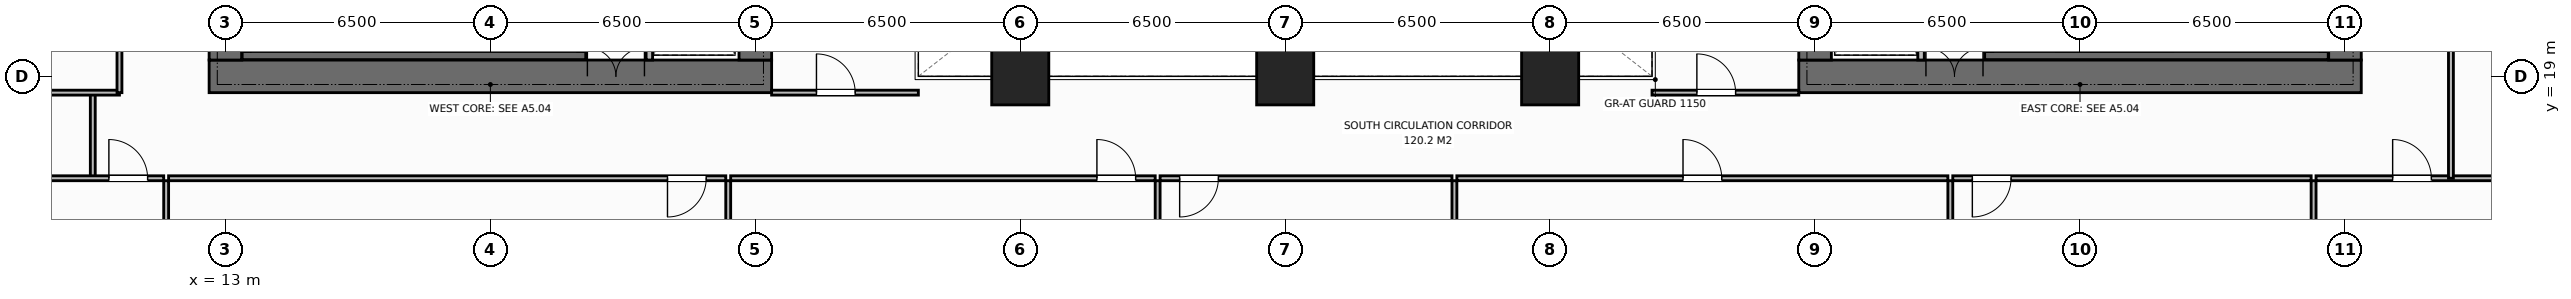
"""IFC4 building model, lengths in metres.
Left out: names, types, materials, properties, quantities, classifications, styles, units other than length and angle.
Written with IfcOpenShell. Run it as: python <this file> out.ifc"""

import sys

from ifc_helpers import new_model, si_unit, direction, frame, frame_2d, origin, origin_2d, place, context, subcontext, project, spatial, rectangle, extrude, element, fill, save


model = new_model("IFC4")
c1 = context("Model", 3, precision=1e-05, world=origin(), true_north=direction((0.0, 1.0)))
c2 = subcontext(c1, "Body", "Model", "MODEL_VIEW")
j1 = project(units=[si_unit("LENGTHUNIT", "METRE"), si_unit("PLANEANGLEUNIT", "RADIAN")], contexts=[c1])
p1 = place(None, origin())
s1 = spatial("IfcSite", under=j1, at=p1, CompositionType="ELEMENT")
p2 = place(p1, origin())
s2 = spatial("IfcBuilding", under=s1, at=p2, CompositionType="ELEMENT")
p3 = place(p2, frame((0.0, 0.0, 77.2)))
s3 = spatial("IfcBuildingStorey", under=s2, at=p3, CompositionType="ELEMENT", Elevation=77.2)
p4 = place(p3, frame((12.6, 19.0, 0.0), z_axis=(0.0, 0.0, 1.0), x_axis=(1.0, 0.0, 0.0)))
e1 = element("IfcWall", 1, at=p4, inside=s3, PredefinedType="SHEAR", context=c2, shape_type="SweptSolid", body=[
    extrude(rectangle(XDim=13.8, YDim=0.8, at=frame_2d((6.9, 0.0))), origin(), (0.0, 0.0, 1.0), 3.8),
])
p5 = place(p4, frame((9.28, 0.0, 0.0)))
e2 = element("IfcOpeningElement", 2, at=p5, cuts=e1, PredefinedType="OPENING", context=c2, shape_type="SweptSolid", body=[
    extrude(rectangle(XDim=1.4, YDim=2.2, at=frame_2d((0.7, 1.1))), frame((0.0, 0.41, 0.0), z_axis=(0.0, -1.0, 0.0), x_axis=(1.0, 0.0, 0.0)), (0.0, 0.0, 1.0), 0.82),
])
p6 = place(p3, frame((13.0, 19.4, 0.0), z_axis=(0.0, 0.0, 1.0), x_axis=(0.0, 1.0, 0.0)))
e3 = element("IfcWall", 3, at=p6, inside=s3, PredefinedType="SHEAR", context=c2, shape_type="SweptSolid", body=[
    extrude(rectangle(XDim=13.2, YDim=0.8, at=frame_2d((6.6, 0.0))), origin(), (0.0, 0.0, 1.0), 3.8),
])
p7 = place(p6, frame((4.65, 0.0, 0.0)))
e4 = element("IfcOpeningElement", 4, at=p7, cuts=e3, PredefinedType="OPENING", context=c2, shape_type="SweptSolid", body=[
    extrude(rectangle(XDim=1.4, YDim=2.2, at=frame_2d((0.7, 1.1))), frame((0.0, 0.41, 0.0), z_axis=(0.0, -1.0, 0.0), x_axis=(1.0, 0.0, 0.0)), (0.0, 0.0, 1.0), 0.82),
])
p8 = place(p3, frame((26.0, 19.4, 0.0), z_axis=(0.0, 0.0, 1.0), x_axis=(0.0, 1.0, 0.0)))
e5 = element("IfcWall", 5, at=p8, inside=s3, PredefinedType="SHEAR", context=c2, shape_type="SweptSolid", body=[
    extrude(rectangle(XDim=13.2, YDim=0.8, at=frame_2d((6.6, 0.0))), origin(), (0.0, 0.0, 1.0), 3.8),
])
p9 = place(p3, frame((51.6, 19.0, 0.0), z_axis=(0.0, 0.0, 1.0), x_axis=(1.0, 0.0, 0.0)))
e6 = element("IfcWall", 6, at=p9, inside=s3, PredefinedType="SHEAR", context=c2, shape_type="SweptSolid", body=[
    extrude(rectangle(XDim=13.8, YDim=0.8, at=frame_2d((6.9, 0.0))), origin(), (0.0, 0.0, 1.0), 3.8),
])
p10 = place(p9, frame((3.12, 0.0, 0.0)))
e7 = element("IfcOpeningElement", 7, at=p10, cuts=e6, PredefinedType="OPENING", context=c2, shape_type="SweptSolid", body=[
    extrude(rectangle(XDim=1.4, YDim=2.2, at=frame_2d((0.7, 1.1))), frame((0.0, 0.41, 0.0), z_axis=(0.0, -1.0, 0.0), x_axis=(1.0, 0.0, 0.0)), (0.0, 0.0, 1.0), 0.82),
])
p11 = place(p3, frame((52.0, 19.4, 0.0), z_axis=(0.0, 0.0, 1.0), x_axis=(0.0, 1.0, 0.0)))
e8 = element("IfcWall", 8, at=p11, inside=s3, PredefinedType="SHEAR", context=c2, shape_type="SweptSolid", body=[
    extrude(rectangle(XDim=13.2, YDim=0.8, at=frame_2d((6.6, 0.0))), origin(), (0.0, 0.0, 1.0), 3.8),
])
p12 = place(p3, frame((65.0, 19.4, 0.0), z_axis=(0.0, 0.0, 1.0), x_axis=(0.0, 1.0, 0.0)))
e9 = element("IfcWall", 9, at=p12, inside=s3, PredefinedType="SHEAR", context=c2, shape_type="SweptSolid", body=[
    extrude(rectangle(XDim=13.2, YDim=0.8, at=frame_2d((6.6, 0.0))), origin(), (0.0, 0.0, 1.0), 3.8),
])
p13 = place(p12, frame((8.05, 0.0, 0.0)))
e10 = element("IfcOpeningElement", 10, at=p13, cuts=e9, PredefinedType="OPENING", context=c2, shape_type="SweptSolid", body=[
    extrude(rectangle(XDim=1.3, YDim=2.2, at=frame_2d((0.65, 1.1))), frame((0.0, 0.41, 0.0), z_axis=(0.0, -1.0, 0.0), x_axis=(1.0, 0.0, 0.0)), (0.0, 0.0, 1.0), 0.82),
])
for number, where, z_axis, x_axis in (
    (11, (13.41, 19.51, 0.0), (0.0, 0.0, 1.0), (1.0, 0.0, 0.0)),
    (12, (56.16, 19.51, 0.0), (0.0, 0.0, 1.0), (1.0, 0.0, 0.0)),
):
    element("IfcWall", number, at=place(p3, frame(where, z_axis=z_axis, x_axis=x_axis)), inside=s3, PredefinedType="SHEAR", context=c2, shape_type="SweptSolid", body=[
        extrude(rectangle(XDim=8.43, YDim=0.2, at=frame_2d((4.215, 0.0))), origin(), (0.0, 0.0, 1.0), 3.8),
    ])
for number, where, z_axis, x_axis in (
    (13, (32.5, 19.0, 0.0), (0.0, 0.0, 1.0), (1.0, 0.0, 0.0)),
    (14, (39.0, 19.0, 0.0), (0.0, 0.0, 1.0), (1.0, 0.0, 0.0)),
    (15, (45.5, 19.0, 0.0), (0.0, 0.0, 1.0), (1.0, 0.0, 0.0)),
):
    element("IfcColumn", number, at=place(p3, frame(where, z_axis=z_axis, x_axis=x_axis)), inside=s3, PredefinedType="COLUMN", context=c2, shape_type="SweptSolid", body=[
        extrude(rectangle(XDim=1.4, YDim=1.4, at=origin_2d()), origin(), (0.0, 0.0, 1.0), 3.8),
    ])
p14 = place(p3, frame((23.4, 19.4, 0.0), z_axis=(0.0, 0.0, 1.0), x_axis=(0.0, 1.0, 0.0)))
e16 = element("IfcWall", 16, at=p14, inside=s3, PredefinedType="STANDARD", context=c2, shape_type="SweptSolid", body=[
    extrude(rectangle(XDim=13.2, YDim=0.16, at=frame_2d((6.6, 0.0))), origin(), (0.0, 0.0, 1.0), 3.52),
])
p15 = place(p14, frame((0.55, 0.0, 0.0)))
e17 = element("IfcOpeningElement", 17, at=p15, cuts=e16, PredefinedType="OPENING", context=c2, shape_type="SweptSolid", body=[
    extrude(rectangle(XDim=1.1, YDim=2.2, at=frame_2d((0.55, 1.1))), frame((0.0, 0.09, 0.0), z_axis=(0.0, -1.0, 0.0), x_axis=(1.0, 0.0, 0.0)), (0.0, 0.0, 1.0), 0.18),
])
p16 = place(p14, frame((2.7, 0.0, 0.0)))
e18 = element("IfcOpeningElement", 18, at=p16, cuts=e16, PredefinedType="OPENING", context=c2, shape_type="SweptSolid", body=[
    extrude(rectangle(XDim=1.1, YDim=2.2, at=frame_2d((0.55, 1.1))), frame((0.0, 0.09, 0.0), z_axis=(0.0, -1.0, 0.0), x_axis=(1.0, 0.0, 0.0)), (0.0, 0.0, 1.0), 0.18),
])
p17 = place(p3, frame((54.6, 19.4, 0.0), z_axis=(0.0, 0.0, 1.0), x_axis=(0.0, 1.0, 0.0)))
e19 = element("IfcWall", 19, at=p17, inside=s3, PredefinedType="STANDARD", context=c2, shape_type="SweptSolid", body=[
    extrude(rectangle(XDim=13.2, YDim=0.16, at=frame_2d((6.6, 0.0))), origin(), (0.0, 0.0, 1.0), 3.52),
])
p18 = place(p17, frame((0.55, 0.0, 0.0)))
e20 = element("IfcOpeningElement", 20, at=p18, cuts=e19, PredefinedType="OPENING", context=c2, shape_type="SweptSolid", body=[
    extrude(rectangle(XDim=1.1, YDim=2.2, at=frame_2d((0.55, 1.1))), frame((0.0, 0.09, 0.0), z_axis=(0.0, -1.0, 0.0), x_axis=(1.0, 0.0, 0.0)), (0.0, 0.0, 1.0), 0.18),
])
p19 = place(p17, frame((2.7, 0.0, 0.0)))
e21 = element("IfcOpeningElement", 21, at=p19, cuts=e19, PredefinedType="OPENING", context=c2, shape_type="SweptSolid", body=[
    extrude(rectangle(XDim=1.1, YDim=2.2, at=frame_2d((0.55, 1.1))), frame((0.0, 0.09, 0.0), z_axis=(0.0, -1.0, 0.0), x_axis=(1.0, 0.0, 0.0)), (0.0, 0.0, 1.0), 0.18),
])
p20 = place(p3, frame((26.4, 18.6, 0.0), z_axis=(0.0, 0.0, 1.0), x_axis=(1.0, 0.0, 0.0)))
e22 = element("IfcWall", 22, at=p20, inside=s3, PredefinedType="PARTITIONING", context=c2, shape_type="SweptSolid", body=[
    extrude(rectangle(XDim=3.6, YDim=0.12, at=frame_2d((1.8, 0.0))), origin(), (0.0, 0.0, 1.0), 3.52),
])
p21 = place(p20, frame((1.1, 0.0, 0.0)))
e23 = element("IfcOpeningElement", 23, at=p21, cuts=e22, PredefinedType="OPENING", context=c2, shape_type="SweptSolid", body=[
    extrude(rectangle(XDim=0.95, YDim=2.15, at=frame_2d((0.475, 1.075))), frame((0.0, 0.07, 0.0), z_axis=(0.0, -1.0, 0.0), x_axis=(1.0, 0.0, 0.0)), (0.0, 0.0, 1.0), 0.14),
])
p22 = place(p3, frame((48.0, 18.6, 0.0), z_axis=(0.0, 0.0, 1.0), x_axis=(1.0, 0.0, 0.0)))
e24 = element("IfcWall", 24, at=p22, inside=s3, PredefinedType="PARTITIONING", context=c2, shape_type="SweptSolid", body=[
    extrude(rectangle(XDim=3.6, YDim=0.12, at=frame_2d((1.8, 0.0))), origin(), (0.0, 0.0, 1.0), 3.52),
])
p23 = place(p22, frame((1.1, 0.0, 0.0)))
e25 = element("IfcOpeningElement", 25, at=p23, cuts=e24, PredefinedType="OPENING", context=c2, shape_type="SweptSolid", body=[
    extrude(rectangle(XDim=0.95, YDim=2.15, at=frame_2d((0.475, 1.075))), frame((0.0, 0.07, 0.0), z_axis=(0.0, -1.0, 0.0), x_axis=(1.0, 0.0, 0.0)), (0.0, 0.0, 1.0), 0.14),
])
p24 = place(p3, frame((9.746, 16.5, 0.0), z_axis=(0.0, 0.0, 1.0), x_axis=(0.0, 1.0, 0.0)))
e26 = element("IfcWall", 26, at=p24, inside=s3, PredefinedType="PARTITIONING", context=c2, shape_type="SweptSolid", body=[
    extrude(rectangle(XDim=2.1, YDim=0.12, at=frame_2d((1.05, 0.0))), origin(), (0.0, 0.0, 1.0), 3.52),
])
p25 = place(p3, frame((11.545, 0.02, 0.0), z_axis=(0.0, 0.0, 1.0), x_axis=(0.0, 1.0, 0.0)))
e27 = element("IfcWall", 27, at=p25, inside=s3, PredefinedType="PARTITIONING", context=c2, shape_type="SweptSolid", body=[
    extrude(rectangle(XDim=16.42, YDim=0.12, at=frame_2d((8.21, 0.0))), origin(), (0.0, 0.0, 1.0), 3.52),
])
p26 = place(p3, frame((-0.02, 16.5, 0.0), z_axis=(0.0, 0.0, 1.0), x_axis=(1.0, 0.0, 0.0)))
e28 = element("IfcWall", 28, at=p26, inside=s3, PredefinedType="PARTITIONING", context=c2, shape_type="SweptSolid", body=[
    extrude(rectangle(XDim=11.506, YDim=0.12, at=frame_2d((5.753, 0.0))), origin(), (0.0, 0.0, 1.0), 3.52),
])
p27 = place(p26, frame((10.16, 0.0, 0.0)))
e29 = element("IfcOpeningElement", 29, at=p27, cuts=e28, PredefinedType="OPENING", context=c2, shape_type="SweptSolid", body=[
    extrude(rectangle(XDim=0.95, YDim=2.15, at=frame_2d((0.475, 1.075))), frame((0.0, 0.07, 0.0), z_axis=(0.0, -1.0, 0.0), x_axis=(1.0, 0.0, 0.0)), (0.0, 0.0, 1.0), 0.14),
])
p28 = place(p3, frame((25.335, 0.02, 0.0), z_axis=(0.0, 0.0, 1.0), x_axis=(0.0, 1.0, 0.0)))
e30 = element("IfcWall", 30, at=p28, inside=s3, PredefinedType="PARTITIONING", context=c2, shape_type="SweptSolid", body=[
    extrude(rectangle(XDim=16.42, YDim=0.12, at=frame_2d((8.21, 0.0))), origin(), (0.0, 0.0, 1.0), 3.52),
])
p29 = place(p3, frame((11.605, 16.5, 0.0), z_axis=(0.0, 0.0, 1.0), x_axis=(1.0, 0.0, 0.0)))
e31 = element("IfcWall", 31, at=p29, inside=s3, PredefinedType="PARTITIONING", context=c2, shape_type="SweptSolid", body=[
    extrude(rectangle(XDim=13.67, YDim=0.12, at=frame_2d((6.835, 0.0))), origin(), (0.0, 0.0, 1.0), 3.52),
])
p30 = place(p29, frame((12.24, 0.0, 0.0)))
e32 = element("IfcOpeningElement", 32, at=p30, cuts=e31, PredefinedType="OPENING", context=c2, shape_type="SweptSolid", body=[
    extrude(rectangle(XDim=0.95, YDim=2.15, at=frame_2d((0.475, 1.075))), frame((0.0, 0.07, 0.0), z_axis=(0.0, -1.0, 0.0), x_axis=(1.0, 0.0, 0.0)), (0.0, 0.0, 1.0), 0.14),
])
p31 = place(p3, frame((35.871, 0.02, 0.0), z_axis=(0.0, 0.0, 1.0), x_axis=(0.0, 1.0, 0.0)))
e33 = element("IfcWall", 33, at=p31, inside=s3, PredefinedType="PARTITIONING", context=c2, shape_type="SweptSolid", body=[
    extrude(rectangle(XDim=16.42, YDim=0.12, at=frame_2d((8.21, 0.0))), origin(), (0.0, 0.0, 1.0), 3.52),
])
p32 = place(p3, frame((25.395, 16.5, 0.0), z_axis=(0.0, 0.0, 1.0), x_axis=(1.0, 0.0, 0.0)))
e34 = element("IfcWall", 34, at=p32, inside=s3, PredefinedType="PARTITIONING", context=c2, shape_type="SweptSolid", body=[
    extrude(rectangle(XDim=10.415, YDim=0.12, at=frame_2d((5.208, 0.0))), origin(), (0.0, 0.0, 1.0), 3.52),
])
p33 = place(p32, frame((8.985, 0.0, 0.0)))
e35 = element("IfcOpeningElement", 35, at=p33, cuts=e34, PredefinedType="OPENING", context=c2, shape_type="SweptSolid", body=[
    extrude(rectangle(XDim=0.95, YDim=2.15, at=frame_2d((0.475, 1.075))), frame((0.0, 0.07, 0.0), z_axis=(0.0, -1.0, 0.0), x_axis=(1.0, 0.0, 0.0)), (0.0, 0.0, 1.0), 0.14),
])
p34 = place(p3, frame((43.152, 0.02, 0.0), z_axis=(0.0, 0.0, 1.0), x_axis=(0.0, 1.0, 0.0)))
e36 = element("IfcWall", 36, at=p34, inside=s3, PredefinedType="PARTITIONING", context=c2, shape_type="SweptSolid", body=[
    extrude(rectangle(XDim=16.42, YDim=0.12, at=frame_2d((8.21, 0.0))), origin(), (0.0, 0.0, 1.0), 3.52),
])
p35 = place(p3, frame((35.931, 16.5, 0.0), z_axis=(0.0, 0.0, 1.0), x_axis=(1.0, 0.0, 0.0)))
e37 = element("IfcWall", 37, at=p35, inside=s3, PredefinedType="PARTITIONING", context=c2, shape_type="SweptSolid", body=[
    extrude(rectangle(XDim=7.161, YDim=0.12, at=frame_2d((3.581, 0.0))), origin(), (0.0, 0.0, 1.0), 3.52),
])
p36 = place(p35, frame((0.48, 0.0, 0.0)))
e38 = element("IfcOpeningElement", 38, at=p36, cuts=e37, PredefinedType="OPENING", context=c2, shape_type="SweptSolid", body=[
    extrude(rectangle(XDim=0.95, YDim=2.15, at=frame_2d((0.475, 1.075))), frame((0.0, 0.07, 0.0), z_axis=(0.0, -1.0, 0.0), x_axis=(1.0, 0.0, 0.0)), (0.0, 0.0, 1.0), 0.14),
])
p37 = place(p3, frame((55.318, 0.02, 0.0), z_axis=(0.0, 0.0, 1.0), x_axis=(0.0, 1.0, 0.0)))
e39 = element("IfcWall", 39, at=p37, inside=s3, PredefinedType="PARTITIONING", context=c2, shape_type="SweptSolid", body=[
    extrude(rectangle(XDim=16.42, YDim=0.12, at=frame_2d((8.21, 0.0))), origin(), (0.0, 0.0, 1.0), 3.52),
])
p38 = place(p3, frame((43.212, 16.5, 0.0), z_axis=(0.0, 0.0, 1.0), x_axis=(1.0, 0.0, 0.0)))
e40 = element("IfcWall", 40, at=p38, inside=s3, PredefinedType="PARTITIONING", context=c2, shape_type="SweptSolid", body=[
    extrude(rectangle(XDim=12.047, YDim=0.12, at=frame_2d((6.023, 0.0))), origin(), (0.0, 0.0, 1.0), 3.52),
])
p39 = place(p38, frame((5.548, 0.0, 0.0)))
e41 = element("IfcOpeningElement", 41, at=p39, cuts=e40, PredefinedType="OPENING", context=c2, shape_type="SweptSolid", body=[
    extrude(rectangle(XDim=0.95, YDim=2.15, at=frame_2d((0.475, 1.075))), frame((0.0, 0.07, 0.0), z_axis=(0.0, -1.0, 0.0), x_axis=(1.0, 0.0, 0.0)), (0.0, 0.0, 1.0), 0.14),
])
p40 = place(p3, frame((64.23, 0.02, 0.0), z_axis=(0.0, 0.0, 1.0), x_axis=(0.0, 1.0, 0.0)))
e42 = element("IfcWall", 42, at=p40, inside=s3, PredefinedType="PARTITIONING", context=c2, shape_type="SweptSolid", body=[
    extrude(rectangle(XDim=16.42, YDim=0.12, at=frame_2d((8.21, 0.0))), origin(), (0.0, 0.0, 1.0), 3.52),
])
p41 = place(p3, frame((55.378, 16.5, 0.0), z_axis=(0.0, 0.0, 1.0), x_axis=(1.0, 0.0, 0.0)))
e43 = element("IfcWall", 43, at=p41, inside=s3, PredefinedType="PARTITIONING", context=c2, shape_type="SweptSolid", body=[
    extrude(rectangle(XDim=8.792, YDim=0.12, at=frame_2d((4.396, 0.0))), origin(), (0.0, 0.0, 1.0), 3.52),
])
p42 = place(p41, frame((0.48, 0.0, 0.0)))
e44 = element("IfcOpeningElement", 44, at=p42, cuts=e43, PredefinedType="OPENING", context=c2, shape_type="SweptSolid", body=[
    extrude(rectangle(XDim=0.95, YDim=2.15, at=frame_2d((0.475, 1.075))), frame((0.0, 0.07, 0.0), z_axis=(0.0, -1.0, 0.0), x_axis=(1.0, 0.0, 0.0)), (0.0, 0.0, 1.0), 0.14),
])
p43 = place(p3, frame((64.29, 16.5, 0.0), z_axis=(0.0, 0.0, 1.0), x_axis=(1.0, 0.0, 0.0)))
e45 = element("IfcWall", 45, at=p43, inside=s3, PredefinedType="PARTITIONING", context=c2, shape_type="SweptSolid", body=[
    extrude(rectangle(XDim=13.73, YDim=0.12, at=frame_2d((6.865, 0.0))), origin(), (0.0, 0.0, 1.0), 3.52),
])
p44 = place(p43, frame((1.88, 0.0, 0.0)))
e46 = element("IfcOpeningElement", 46, at=p44, cuts=e45, PredefinedType="OPENING", context=c2, shape_type="SweptSolid", body=[
    extrude(rectangle(XDim=0.95, YDim=2.15, at=frame_2d((0.475, 1.075))), frame((0.0, 0.07, 0.0), z_axis=(0.0, -1.0, 0.0), x_axis=(1.0, 0.0, 0.0)), (0.0, 0.0, 1.0), 0.14),
])
p45 = place(p3, frame((-0.18, 18.6, 0.0), z_axis=(0.0, 0.0, 1.0), x_axis=(1.0, 0.0, 0.0)))
e47 = element("IfcWall", 47, at=p45, inside=s3, PredefinedType="PARTITIONING", context=c2, shape_type="SweptSolid", body=[
    extrude(rectangle(XDim=10.58, YDim=0.12, at=frame_2d((5.29, 0.0))), origin(), (0.0, 0.0, 1.0), 3.52),
])
p46 = place(p3, frame((10.4, 18.6, 0.0), z_axis=(0.0, 0.0, 1.0), x_axis=(0.0, 1.0, 0.0)))
e48 = element("IfcWall", 48, at=p46, inside=s3, PredefinedType="PARTITIONING", context=c2, shape_type="SweptSolid", body=[
    extrude(rectangle(XDim=8.45, YDim=0.12, at=frame_2d((4.225, 0.0))), origin(), (0.0, 0.0, 1.0), 3.52),
])
p47 = place(p46, frame((3.75, 0.0, 0.0)))
e49 = element("IfcOpeningElement", 49, at=p47, cuts=e48, PredefinedType="OPENING", context=c2, shape_type="SweptSolid", body=[
    extrude(rectangle(XDim=0.95, YDim=2.15, at=frame_2d((0.475, 1.075))), frame((0.0, 0.07, 0.0), z_axis=(0.0, -1.0, 0.0), x_axis=(1.0, 0.0, 0.0)), (0.0, 0.0, 1.0), 0.14),
])
p48 = place(p3, frame((67.6, 16.5, 0.0), z_axis=(0.0, 0.0, 1.0), x_axis=(0.0, 1.0, 0.0)))
e50 = element("IfcWall", 50, at=p48, inside=s3, PredefinedType="PARTITIONING", context=c2, shape_type="SweptSolid", body=[
    extrude(rectangle(XDim=16.9, YDim=0.12, at=frame_2d((8.45, 0.0))), origin(), (0.0, 0.0, 1.0), 3.52),
])
p49 = place(p48, frame((9.025, 0.0, 0.0)))
e51 = element("IfcOpeningElement", 51, at=p49, cuts=e50, PredefinedType="OPENING", context=c2, shape_type="SweptSolid", body=[
    extrude(rectangle(XDim=0.95, YDim=2.15, at=frame_2d((0.475, 1.075))), frame((0.0, 0.07, 0.0), z_axis=(0.0, -1.0, 0.0), x_axis=(1.0, 0.0, 0.0)), (0.0, 0.0, 1.0), 0.14),
])
p50 = place(p5, origin())
e52 = element("IfcDoor", 52, at=p50, inside=s3, OperationType="DOUBLE_DOOR_SINGLE_SWING", PredefinedType="DOOR", context=c2, shape_type="SweptSolid", body=[
    extrude(rectangle(XDim=1.4, YDim=2.2, at=frame_2d((0.7, 1.1))), frame((0.0, 0.125, 0.0), z_axis=(0.0, -1.0, 0.0), x_axis=(1.0, 0.0, 0.0)), (0.0, 0.0, 1.0), 0.05),
])
fill(e2, e52)
p51 = place(p10, origin())
e53 = element("IfcDoor", 53, at=p51, inside=s3, OperationType="DOUBLE_DOOR_SINGLE_SWING", PredefinedType="DOOR", context=c2, shape_type="SweptSolid", body=[
    extrude(rectangle(XDim=1.4, YDim=2.2, at=frame_2d((0.7, 1.1))), frame((0.0, 0.125, 0.0), z_axis=(0.0, -1.0, 0.0), x_axis=(1.0, 0.0, 0.0)), (0.0, 0.0, 1.0), 0.05),
])
fill(e7, e53)
p52 = place(p21, origin())
e54 = element("IfcDoor", 54, at=p52, inside=s3, OperationType="SINGLE_SWING_LEFT", PredefinedType="DOOR", context=c2, shape_type="SweptSolid", body=[
    extrude(rectangle(XDim=0.95, YDim=2.15, at=frame_2d((0.475, 1.075))), frame((0.0, 0.025, 0.0), z_axis=(0.0, -1.0, 0.0), x_axis=(1.0, 0.0, 0.0)), (0.0, 0.0, 1.0), 0.05),
])
fill(e23, e54)
p53 = place(p23, origin())
e55 = element("IfcDoor", 55, at=p53, inside=s3, OperationType="SINGLE_SWING_LEFT", PredefinedType="DOOR", context=c2, shape_type="SweptSolid", body=[
    extrude(rectangle(XDim=0.95, YDim=2.15, at=frame_2d((0.475, 1.075))), frame((0.0, 0.025, 0.0), z_axis=(0.0, -1.0, 0.0), x_axis=(1.0, 0.0, 0.0)), (0.0, 0.0, 1.0), 0.05),
])
fill(e25, e55)
p54 = place(p27, origin())
e56 = element("IfcDoor", 56, at=p54, inside=s3, OperationType="SINGLE_SWING_LEFT", PredefinedType="DOOR", context=c2, shape_type="SweptSolid", body=[
    extrude(rectangle(XDim=0.95, YDim=2.15, at=frame_2d((0.475, 1.075))), frame((0.0, 0.025, 0.0), z_axis=(0.0, -1.0, 0.0), x_axis=(1.0, 0.0, 0.0)), (0.0, 0.0, 1.0), 0.05),
])
fill(e29, e56)
p55 = place(p30, origin())
e57 = element("IfcDoor", 57, at=p55, inside=s3, OperationType="SINGLE_SWING_RIGHT", PredefinedType="DOOR", context=c2, shape_type="SweptSolid", body=[
    extrude(rectangle(XDim=0.95, YDim=2.15, at=frame_2d((0.475, 1.075))), frame((0.0, 0.025, 0.0), z_axis=(0.0, -1.0, 0.0), x_axis=(1.0, 0.0, 0.0)), (0.0, 0.0, 1.0), 0.05),
])
fill(e32, e57)
p56 = place(p33, origin())
e58 = element("IfcDoor", 58, at=p56, inside=s3, OperationType="SINGLE_SWING_LEFT", PredefinedType="DOOR", context=c2, shape_type="SweptSolid", body=[
    extrude(rectangle(XDim=0.95, YDim=2.15, at=frame_2d((0.475, 1.075))), frame((0.0, 0.025, 0.0), z_axis=(0.0, -1.0, 0.0), x_axis=(1.0, 0.0, 0.0)), (0.0, 0.0, 1.0), 0.05),
])
fill(e35, e58)
p57 = place(p36, origin())
e59 = element("IfcDoor", 59, at=p57, inside=s3, OperationType="SINGLE_SWING_RIGHT", PredefinedType="DOOR", context=c2, shape_type="SweptSolid", body=[
    extrude(rectangle(XDim=0.95, YDim=2.15, at=frame_2d((0.475, 1.075))), frame((0.0, 0.025, 0.0), z_axis=(0.0, -1.0, 0.0), x_axis=(1.0, 0.0, 0.0)), (0.0, 0.0, 1.0), 0.05),
])
fill(e38, e59)
p58 = place(p39, origin())
e60 = element("IfcDoor", 60, at=p58, inside=s3, OperationType="SINGLE_SWING_LEFT", PredefinedType="DOOR", context=c2, shape_type="SweptSolid", body=[
    extrude(rectangle(XDim=0.95, YDim=2.15, at=frame_2d((0.475, 1.075))), frame((0.0, 0.025, 0.0), z_axis=(0.0, -1.0, 0.0), x_axis=(1.0, 0.0, 0.0)), (0.0, 0.0, 1.0), 0.05),
])
fill(e41, e60)
p59 = place(p42, origin())
e61 = element("IfcDoor", 61, at=p59, inside=s3, OperationType="SINGLE_SWING_RIGHT", PredefinedType="DOOR", context=c2, shape_type="SweptSolid", body=[
    extrude(rectangle(XDim=0.95, YDim=2.15, at=frame_2d((0.475, 1.075))), frame((0.0, 0.025, 0.0), z_axis=(0.0, -1.0, 0.0), x_axis=(1.0, 0.0, 0.0)), (0.0, 0.0, 1.0), 0.05),
])
fill(e44, e61)
p60 = place(p44, origin())
e62 = element("IfcDoor", 62, at=p60, inside=s3, OperationType="SINGLE_SWING_LEFT", PredefinedType="DOOR", context=c2, shape_type="SweptSolid", body=[
    extrude(rectangle(XDim=0.95, YDim=2.15, at=frame_2d((0.475, 1.075))), frame((0.0, 0.025, 0.0), z_axis=(0.0, -1.0, 0.0), x_axis=(1.0, 0.0, 0.0)), (0.0, 0.0, 1.0), 0.05),
])
fill(e46, e62)
save(model, sys.argv[1])
